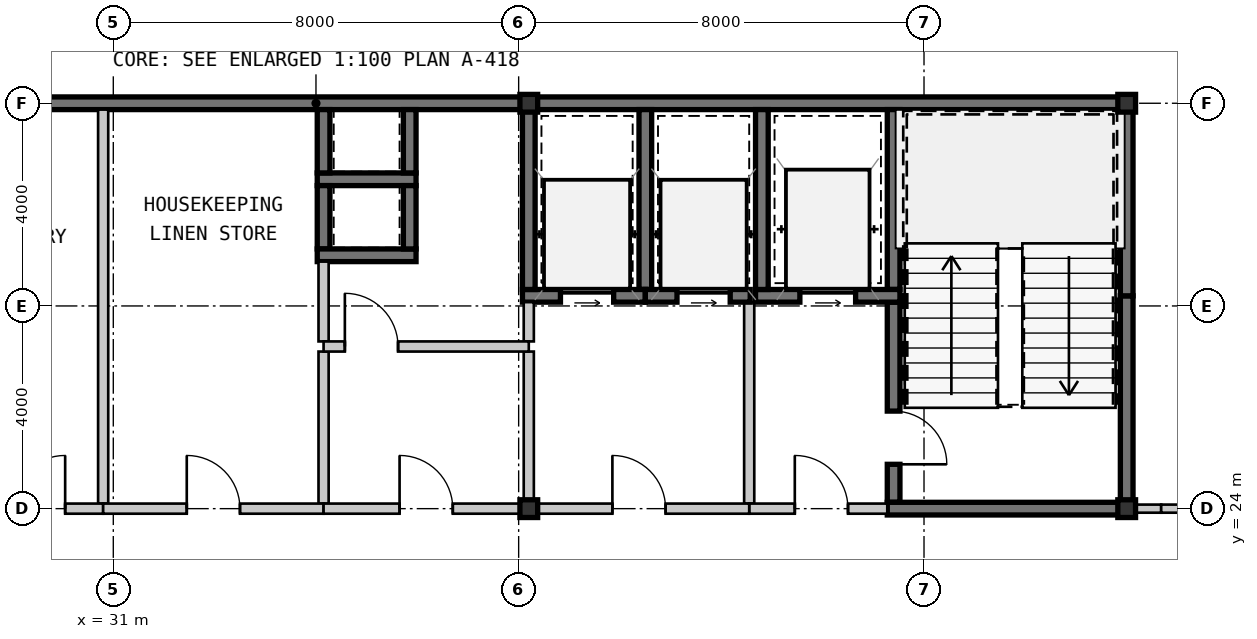
"""IFC4 building model, lengths in metres.
Left out: names, types, materials, properties, quantities, classifications, styles, units other than length and angle.
Written with IfcOpenShell. Run it as: python <this file> out.ifc"""

import sys

from ifc_helpers import new_model, si_unit, direction, frame, frame_2d, origin, origin_2d, place, context, subcontext, project, spatial, rectangle, hollow_rectangle, extrude, source, transform, mapped, element, fill, save


model = new_model("IFC4")
c1 = context("Model", 3, precision=1e-05, world=origin(), true_north=direction((0.0, 1.0)))
c2 = subcontext(c1, "Body", "Model", "MODEL_VIEW")
j1 = project(units=[si_unit("LENGTHUNIT", "METRE"), si_unit("PLANEANGLEUNIT", "RADIAN")], contexts=[c1])
p1 = place(None, origin())
s1 = spatial("IfcSite", under=j1, at=p1, CompositionType="ELEMENT")
p2 = place(p1, origin())
s2 = spatial("IfcBuilding", under=s1, at=p2, CompositionType="ELEMENT")
p3 = place(p2, frame((0.0, 0.0, 172.55)))
s3 = spatial("IfcBuildingStorey", under=s2, at=p3, CompositionType="ELEMENT", Elevation=172.55)
m1 = source(origin(), c2, "Body", "SweptSolid", [
    extrude(hollow_rectangle(XDim=0.35, YDim=0.35, WallThickness=0.016, at=origin_2d()), origin(), (0.0, 0.0, 1.0), 3.15),
])
for number, where, z_axis, x_axis in (
    (1, (39.2, 24.0, 0.0), (0.0, 0.0, 1.0), (1.0, 0.0, 0.0)),
    (2, (51.0, 24.0, 0.0), (0.0, 0.0, 1.0), (1.0, 0.0, 0.0)),
    (3, (39.2, 32.0, 0.0), (0.0, 0.0, 1.0), (1.0, 0.0, 0.0)),
    (4, (51.0, 32.0, 0.0), (0.0, 0.0, 1.0), (1.0, 0.0, 0.0)),
):
    element("IfcColumn", number, at=place(p3, frame(where, z_axis=z_axis, x_axis=x_axis)), inside=s3, PredefinedType="COLUMN", context=c2, shape_type="MappedRepresentation", body=[
        mapped(m1, transform((0.0, 0.0, 0.0), scale=1.0)),
    ])
m2 = source(origin(), c2, "Body", "SweptSolid", [
    extrude(rectangle(XDim=11.2, YDim=0.25, at=frame_2d((5.6, 0.0))), origin(), (0.0, 0.0, 1.0), 2.93),
])
p4 = place(p3, frame((28.0, 32.0, 0.0), z_axis=(0.0, 0.0, 1.0), x_axis=(1.0, 0.0, 0.0)))
e5 = element("IfcWall", 5, at=p4, inside=s3, PredefinedType="SHEAR", context=c2, shape_type="MappedRepresentation", body=[
    mapped(m2, transform((0.0, 0.0, 0.0), scale=1.0)),
])
m3 = source(origin(), c2, "Body", "SweptSolid", [
    extrude(rectangle(XDim=11.925, YDim=0.25, at=frame_2d((5.962, 0.0))), origin(), (0.0, 0.0, 1.0), 2.93),
])
p5 = place(p3, frame((39.2, 32.0, 0.0), z_axis=(0.0, 0.0, 1.0), x_axis=(1.0, 0.0, 0.0)))
e6 = element("IfcWall", 6, at=p5, inside=s3, PredefinedType="SHEAR", context=c2, shape_type="MappedRepresentation", body=[
    mapped(m3, transform((0.0, 0.0, 0.0), scale=1.0)),
])
m4 = source(origin(), c2, "Body", "SweptSolid", [
    extrude(rectangle(XDim=4.075, YDim=0.25, at=frame_2d((2.038, 0.0))), origin(), (0.0, 0.0, 1.0), 2.93),
])
p6 = place(p3, frame((51.0, 24.125, 0.0), z_axis=(0.0, 0.0, 1.0), x_axis=(0.0, 1.0, 0.0)))
e7 = element("IfcWall", 7, at=p6, inside=s3, PredefinedType="SHEAR", context=c2, shape_type="MappedRepresentation", body=[
    mapped(m4, transform((0.0, 0.0, 0.0), scale=1.0)),
])
m5 = source(origin(), c2, "Body", "SweptSolid", [
    extrude(rectangle(XDim=3.675, YDim=0.25, at=frame_2d((1.837, 0.0))), origin(), (0.0, 0.0, 1.0), 2.93),
])
p7 = place(p3, frame((51.0, 28.2, 0.0), z_axis=(0.0, 0.0, 1.0), x_axis=(0.0, 1.0, 0.0)))
e8 = element("IfcWall", 8, at=p7, inside=s3, PredefinedType="SHEAR", context=c2, shape_type="MappedRepresentation", body=[
    mapped(m5, transform((0.0, 0.0, 0.0), scale=1.0)),
])
m6 = source(origin(), c2, "Body", "SweptSolid", [
    extrude(rectangle(XDim=3.55, YDim=0.25, at=frame_2d((1.775, 0.0))), origin(), (0.0, 0.0, 1.0), 2.93),
])
p8 = place(p3, frame((46.4, 31.875, 0.0), z_axis=(0.0, 0.0, 1.0), x_axis=(0.0, -1.0, 0.0)))
e9 = element("IfcWall", 9, at=p8, inside=s3, PredefinedType="SHEAR", context=c2, shape_type="MappedRepresentation", body=[
    mapped(m6, transform((0.0, 0.0, 0.0), scale=1.0)),
])
m7 = source(origin(), c2, "Body", "SweptSolid", [
    extrude(rectangle(XDim=3.95, YDim=0.25, at=frame_2d((1.975, 0.0))), origin(), (0.0, 0.0, 1.0), 2.93),
])
p9 = place(p3, frame((46.4, 28.075, 0.0), z_axis=(0.0, 0.0, 1.0), x_axis=(0.0, -1.0, 0.0)))
e10 = element("IfcWall", 10, at=p9, inside=s3, PredefinedType="SHEAR", context=c2, shape_type="MappedRepresentation", body=[
    mapped(m7, transform((0.0, 0.0, 0.0), scale=1.0)),
])
m8 = source(origin(), c2, "Body", "SweptSolid", [
    extrude(rectangle(XDim=1.05, YDim=2.1, at=frame_2d((0.525, 1.05))), frame((0.0, 0.135, 0.0), z_axis=(0.0, -1.0, 0.0), x_axis=(1.0, 0.0, 0.0)), (0.0, 0.0, 1.0), 0.27),
])
p10 = place(p9, frame((2.15, 0.0, 0.0)))
e11 = element("IfcOpeningElement", 11, at=p10, cuts=e10, PredefinedType="OPENING", context=c2, shape_type="MappedRepresentation", body=[
    mapped(m8, transform((0.0, 0.0, 0.0), scale=1.0)),
])
m9 = source(origin(), c2, "Body", "SweptSolid", [
    extrude(rectangle(XDim=4.85, YDim=0.25, at=frame_2d((2.425, 0.0))), origin(), (0.0, 0.0, 1.0), 2.93),
])
p11 = place(p3, frame((46.275, 24.0, 0.0), z_axis=(0.0, 0.0, 1.0), x_axis=(1.0, 0.0, 0.0)))
e12 = element("IfcWall", 12, at=p11, inside=s3, PredefinedType="SHEAR", context=c2, shape_type="MappedRepresentation", body=[
    mapped(m9, transform((0.0, 0.0, 0.0), scale=1.0)),
])
m10 = source(origin(), c2, "Body", "SweptSolid", [
    extrude(rectangle(XDim=2.85, YDim=0.25, at=frame_2d((1.425, 0.0))), origin(), (0.0, 0.0, 1.0), 2.93),
])
p12 = place(p3, frame((43.675, 28.2, 0.0), z_axis=(0.0, 0.0, 1.0), x_axis=(1.0, 0.0, 0.0)))
e13 = element("IfcWall", 13, at=p12, inside=s3, PredefinedType="SHEAR", context=c2, shape_type="MappedRepresentation", body=[
    mapped(m10, transform((0.0, 0.0, 0.0), scale=1.0)),
])
m11 = source(origin(), c2, "Body", "SweptSolid", [
    extrude(rectangle(XDim=1.1, YDim=2.15, at=frame_2d((0.55, 1.075))), frame((0.0, 0.135, 0.0), z_axis=(0.0, -1.0, 0.0), x_axis=(1.0, 0.0, 0.0)), (0.0, 0.0, 1.0), 0.27),
])
p13 = place(p12, frame((0.875, 0.0, 0.0)))
e14 = element("IfcOpeningElement", 14, at=p13, cuts=e13, PredefinedType="OPENING", context=c2, shape_type="MappedRepresentation", body=[
    mapped(m11, transform((0.0, 0.0, 0.0), scale=1.0)),
])
p14 = place(p3, frame((43.8, 31.875, 0.0), z_axis=(0.0, 0.0, 1.0), x_axis=(0.0, -1.0, 0.0)))
e15 = element("IfcWall", 15, at=p14, inside=s3, PredefinedType="SHEAR", context=c2, shape_type="MappedRepresentation", body=[
    mapped(m6, transform((0.0, 0.0, 0.0), scale=1.0)),
])
m12 = source(origin(), c2, "Body", "SweptSolid", [
    extrude(rectangle(XDim=3.975, YDim=0.2, at=frame_2d((1.987, 0.0))), origin(), (0.0, 0.0, 1.0), 2.93),
])
p15 = place(p3, frame((43.55, 28.075, 0.0), z_axis=(0.0, 0.0, 1.0), x_axis=(0.0, -1.0, 0.0)))
e16 = element("IfcWall", 16, at=p15, inside=s3, PredefinedType="SOLIDWALL", context=c2, shape_type="MappedRepresentation", body=[
    mapped(m12, transform((0.0, 0.0, 0.0), scale=1.0)),
])
m13 = source(origin(), c2, "Body", "SweptSolid", [
    extrude(rectangle(XDim=2.725, YDim=0.2, at=frame_2d((1.362, 0.0))), origin(), (0.0, 0.0, 1.0), 2.397),
])
p16 = place(p3, frame((43.55, 24.0, 0.0), z_axis=(0.0, 0.0, 1.0), x_axis=(1.0, 0.0, 0.0)))
e17 = element("IfcWall", 17, at=p16, inside=s3, PredefinedType="SOLIDWALL", context=c2, shape_type="MappedRepresentation", body=[
    mapped(m13, transform((0.0, 0.0, 0.0), scale=1.0)),
])
m14 = source(origin(), c2, "Body", "SweptSolid", [
    extrude(rectangle(XDim=1.05, YDim=2.1, at=frame_2d((0.525, 1.05))), frame((0.0, 0.11, 0.0), z_axis=(0.0, -1.0, 0.0), x_axis=(1.0, 0.0, 0.0)), (0.0, 0.0, 1.0), 0.22),
])
p17 = place(p16, frame((0.9, 0.0, 0.0)))
e18 = element("IfcOpeningElement", 18, at=p17, cuts=e17, PredefinedType="OPENING", context=c2, shape_type="MappedRepresentation", body=[
    mapped(m14, transform((0.0, 0.0, 0.0), scale=1.0)),
])
m15 = source(origin(), c2, "Body", "SweptSolid", [
    extrude(rectangle(XDim=1.95, YDim=0.25, at=frame_2d((0.975, 0.0))), origin(), (0.0, 0.0, 1.0), 2.93),
])
p18 = place(p3, frame((35.025, 30.5, 0.0), z_axis=(0.0, 0.0, 1.0), x_axis=(1.0, 0.0, 0.0)))
e19 = element("IfcWall", 19, at=p18, inside=s3, PredefinedType="SHEAR", context=c2, shape_type="MappedRepresentation", body=[
    mapped(m15, transform((0.0, 0.0, 0.0), scale=1.0)),
])
m16 = source(origin(), c2, "Body", "SweptSolid", [
    extrude(rectangle(XDim=1.25, YDim=0.25, at=frame_2d((0.625, 0.0))), origin(), (0.0, 0.0, 1.0), 2.93),
])
for number, where, z_axis, x_axis in (
    (20, (35.15, 31.875, 0.0), (0.0, 0.0, 1.0), (0.0, -1.0, 0.0)),
    (21, (36.85, 30.625, 0.0), (0.0, 0.0, 1.0), (0.0, 1.0, 0.0)),
    (22, (35.15, 30.375, 0.0), (0.0, 0.0, 1.0), (0.0, -1.0, 0.0)),
):
    element("IfcWall", number, at=place(p3, frame(where, z_axis=z_axis, x_axis=x_axis)), inside=s3, PredefinedType="SHEAR", context=c2, shape_type="MappedRepresentation", body=[
        mapped(m16, transform((0.0, 0.0, 0.0), scale=1.0)),
    ])
p19 = place(p3, frame((35.025, 29.0, 0.0), z_axis=(0.0, 0.0, 1.0), x_axis=(1.0, 0.0, 0.0)))
e23 = element("IfcWall", 23, at=p19, inside=s3, PredefinedType="SHEAR", context=c2, shape_type="MappedRepresentation", body=[
    mapped(m15, transform((0.0, 0.0, 0.0), scale=1.0)),
])
p20 = place(p3, frame((36.85, 29.125, 0.0), z_axis=(0.0, 0.0, 1.0), x_axis=(0.0, 1.0, 0.0)))
e24 = element("IfcWall", 24, at=p20, inside=s3, PredefinedType="SHEAR", context=c2, shape_type="MappedRepresentation", body=[
    mapped(m16, transform((0.0, 0.0, 0.0), scale=1.0)),
])
p21 = place(p3, frame((41.5, 28.325, 0.0), z_axis=(0.0, 0.0, 1.0), x_axis=(0.0, 1.0, 0.0)))
e25 = element("IfcWall", 25, at=p21, inside=s3, PredefinedType="SHEAR", context=c2, shape_type="MappedRepresentation", body=[
    mapped(m6, transform((0.0, 0.0, 0.0), scale=1.0)),
])
m17 = source(origin(), c2, "Body", "SweptSolid", [
    extrude(rectangle(XDim=2.425, YDim=0.25, at=frame_2d((1.212, 0.0))), origin(), (0.0, 0.0, 1.0), 2.93),
])
p22 = place(p3, frame((39.075, 28.2, 0.0), z_axis=(0.0, 0.0, 1.0), x_axis=(1.0, 0.0, 0.0)))
e26 = element("IfcWall", 26, at=p22, inside=s3, PredefinedType="SHEAR", context=c2, shape_type="MappedRepresentation", body=[
    mapped(m17, transform((0.0, 0.0, 0.0), scale=1.0)),
])
m18 = source(origin(), c2, "Body", "SweptSolid", [
    extrude(rectangle(XDim=1.05, YDim=2.15, at=frame_2d((0.525, 1.075))), frame((0.0, 0.135, 0.0), z_axis=(0.0, -1.0, 0.0), x_axis=(1.0, 0.0, 0.0)), (0.0, 0.0, 1.0), 0.27),
])
p23 = place(p22, frame((0.75, 0.0, 0.0)))
e27 = element("IfcOpeningElement", 27, at=p23, cuts=e26, PredefinedType="OPENING", context=c2, shape_type="MappedRepresentation", body=[
    mapped(m18, transform((0.0, 0.0, 0.0), scale=1.0)),
])
p24 = place(p3, frame((39.2, 31.875, 0.0), z_axis=(0.0, 0.0, 1.0), x_axis=(0.0, -1.0, 0.0)))
e28 = element("IfcWall", 28, at=p24, inside=s3, PredefinedType="SHEAR", context=c2, shape_type="MappedRepresentation", body=[
    mapped(m6, transform((0.0, 0.0, 0.0), scale=1.0)),
])
m19 = source(origin(), c2, "Body", "SweptSolid", [
    extrude(rectangle(XDim=2.07, YDim=0.25, at=frame_2d((1.035, 0.0))), origin(), (0.0, 0.0, 1.0), 2.93),
])
p25 = place(p3, frame((41.5, 28.2, 0.0), z_axis=(0.0, 0.0, 1.0), x_axis=(1.0, 0.0, 0.0)))
e29 = element("IfcWall", 29, at=p25, inside=s3, PredefinedType="SHEAR", context=c2, shape_type="MappedRepresentation", body=[
    mapped(m19, transform((0.0, 0.0, 0.0), scale=1.0)),
])
p26 = place(p25, frame((0.625, 0.0, 0.0)))
e30 = element("IfcOpeningElement", 30, at=p26, cuts=e29, PredefinedType="OPENING", context=c2, shape_type="MappedRepresentation", body=[
    mapped(m18, transform((0.0, 0.0, 0.0), scale=1.0)),
])
m20 = source(origin(), c2, "Body", "SweptSolid", [
    extrude(rectangle(XDim=3.0, YDim=0.2, at=frame_2d((1.5, 0.0))), origin(), (0.0, 0.0, 1.0), 2.47),
])
p27 = place(p3, frame((39.2, 24.1, 0.0), z_axis=(0.0, 0.0, 1.0), x_axis=(0.0, 1.0, 0.0)))
e31 = element("IfcWall", 31, at=p27, inside=s3, PredefinedType="SOLIDWALL", context=c2, shape_type="MappedRepresentation", body=[
    mapped(m20, transform((0.0, 0.0, 0.0), scale=1.0)),
])
m21 = source(origin(), c2, "Body", "SweptSolid", [
    extrude(rectangle(XDim=0.775, YDim=0.2, at=frame_2d((0.387, 0.0))), origin(), (0.0, 0.0, 1.0), 2.47),
])
p28 = place(p3, frame((39.2, 27.3, 0.0), z_axis=(0.0, 0.0, 1.0), x_axis=(0.0, 1.0, 0.0)))
e32 = element("IfcWall", 32, at=p28, inside=s3, PredefinedType="SOLIDWALL", context=c2, shape_type="MappedRepresentation", body=[
    mapped(m21, transform((0.0, 0.0, 0.0), scale=1.0)),
])
m22 = source(origin(), c2, "Body", "SweptSolid", [
    extrude(rectangle(XDim=4.35, YDim=0.2, at=frame_2d((2.175, 0.0))), origin(), (0.0, 0.0, 1.0), 2.397),
])
p29 = place(p3, frame((43.55, 24.0, 0.0), z_axis=(0.0, 0.0, 1.0), x_axis=(-1.0, 0.0, 0.0)))
e33 = element("IfcWall", 33, at=p29, inside=s3, PredefinedType="SOLIDWALL", context=c2, shape_type="MappedRepresentation", body=[
    mapped(m22, transform((0.0, 0.0, 0.0), scale=1.0)),
])
p30 = place(p29, frame((1.65, 0.0, 0.0)))
e34 = element("IfcOpeningElement", 34, at=p30, cuts=e33, PredefinedType="OPENING", context=c2, shape_type="MappedRepresentation", body=[
    mapped(m14, transform((0.0, 0.0, 0.0), scale=1.0)),
])
m23 = source(origin(), c2, "Body", "SweptSolid", [
    extrude(rectangle(XDim=7.775, YDim=0.2, at=frame_2d((3.887, 0.0))), origin(), (0.0, 0.0, 1.0), 2.93),
])
p31 = place(p3, frame((30.8, 31.875, 0.0), z_axis=(0.0, 0.0, 1.0), x_axis=(0.0, -1.0, 0.0)))
e35 = element("IfcWall", 35, at=p31, inside=s3, PredefinedType="SOLIDWALL", context=c2, shape_type="MappedRepresentation", body=[
    mapped(m23, transform((0.0, 0.0, 0.0), scale=1.0)),
])
m24 = source(origin(), c2, "Body", "SweptSolid", [
    extrude(rectangle(XDim=4.35, YDim=0.2, at=frame_2d((2.175, 0.0))), origin(), (0.0, 0.0, 1.0), 2.47),
])
p32 = place(p3, frame((30.8, 24.0, 0.0), z_axis=(0.0, 0.0, 1.0), x_axis=(-1.0, 0.0, 0.0)))
e36 = element("IfcWall", 36, at=p32, inside=s3, PredefinedType="SOLIDWALL", context=c2, shape_type="MappedRepresentation", body=[
    mapped(m24, transform((0.0, 0.0, 0.0), scale=1.0)),
])
p33 = place(p32, frame((0.75, 0.0, 0.0)))
e37 = element("IfcOpeningElement", 37, at=p33, cuts=e36, PredefinedType="OPENING", context=c2, shape_type="MappedRepresentation", body=[
    mapped(m14, transform((0.0, 0.0, 0.0), scale=1.0)),
])
m25 = source(origin(), c2, "Body", "SweptSolid", [
    extrude(rectangle(XDim=3.0, YDim=0.2, at=frame_2d((1.5, 0.0))), origin(), (0.0, 0.0, 1.0), 2.93),
])
p34 = place(p3, frame((35.15, 27.1, 0.0), z_axis=(0.0, 0.0, 1.0), x_axis=(0.0, -1.0, 0.0)))
e38 = element("IfcWall", 38, at=p34, inside=s3, PredefinedType="SOLIDWALL", context=c2, shape_type="MappedRepresentation", body=[
    mapped(m25, transform((0.0, 0.0, 0.0), scale=1.0)),
])
m26 = source(origin(), c2, "Body", "SweptSolid", [
    extrude(rectangle(XDim=1.575, YDim=0.2, at=frame_2d((0.788, 0.0))), origin(), (0.0, 0.0, 1.0), 2.93),
])
p35 = place(p3, frame((35.15, 28.875, 0.0), z_axis=(0.0, 0.0, 1.0), x_axis=(0.0, -1.0, 0.0)))
e39 = element("IfcWall", 39, at=p35, inside=s3, PredefinedType="SOLIDWALL", context=c2, shape_type="MappedRepresentation", body=[
    mapped(m26, transform((0.0, 0.0, 0.0), scale=1.0)),
])
m27 = source(origin(), c2, "Body", "SweptSolid", [
    extrude(rectangle(XDim=4.35, YDim=0.2, at=frame_2d((2.175, 0.0))), origin(), (0.0, 0.0, 1.0), 2.47),
])
p36 = place(p3, frame((35.15, 24.0, 0.0), z_axis=(0.0, 0.0, 1.0), x_axis=(-1.0, 0.0, 0.0)))
e40 = element("IfcWall", 40, at=p36, inside=s3, PredefinedType="SOLIDWALL", context=c2, shape_type="MappedRepresentation", body=[
    mapped(m27, transform((0.0, 0.0, 0.0), scale=1.0)),
])
p37 = place(p36, frame((1.65, 0.0, 0.0)))
e41 = element("IfcOpeningElement", 41, at=p37, cuts=e40, PredefinedType="OPENING", context=c2, shape_type="MappedRepresentation", body=[
    mapped(m14, transform((0.0, 0.0, 0.0), scale=1.0)),
])
m28 = source(origin(), c2, "Body", "SweptSolid", [
    extrude(rectangle(XDim=4.05, YDim=0.2, at=frame_2d((2.025, 0.0))), origin(), (0.0, 0.0, 1.0), 2.93),
])
p38 = place(p3, frame((35.15, 27.2, 0.0), z_axis=(0.0, 0.0, 1.0), x_axis=(1.0, 0.0, 0.0)))
e42 = element("IfcWall", 42, at=p38, inside=s3, PredefinedType="SOLIDWALL", context=c2, shape_type="MappedRepresentation", body=[
    mapped(m28, transform((0.0, 0.0, 0.0), scale=1.0)),
])
p39 = place(p38, frame((0.42, 0.0, 0.0)))
e43 = element("IfcOpeningElement", 43, at=p39, cuts=e42, PredefinedType="OPENING", context=c2, shape_type="MappedRepresentation", body=[
    mapped(m14, transform((0.0, 0.0, 0.0), scale=1.0)),
])
m29 = source(origin(), c2, "Body", "SweptSolid", [
    extrude(rectangle(XDim=4.05, YDim=0.2, at=frame_2d((2.025, 0.0))), origin(), (0.0, 0.0, 1.0), 2.47),
])
p40 = place(p3, frame((39.2, 24.0, 0.0), z_axis=(0.0, 0.0, 1.0), x_axis=(-1.0, 0.0, 0.0)))
e44 = element("IfcWall", 44, at=p40, inside=s3, PredefinedType="SOLIDWALL", context=c2, shape_type="MappedRepresentation", body=[
    mapped(m29, transform((0.0, 0.0, 0.0), scale=1.0)),
])
p41 = place(p40, frame((1.5, 0.0, 0.0)))
e45 = element("IfcOpeningElement", 45, at=p41, cuts=e44, PredefinedType="OPENING", context=c2, shape_type="MappedRepresentation", body=[
    mapped(m14, transform((0.0, 0.0, 0.0), scale=1.0)),
])
m30 = source(origin(), c2, "Body", "SweptSolid", [
    extrude(rectangle(XDim=0.556, YDim=0.16, at=frame_2d((0.278, 0.0))), origin(), (0.0, 0.0, 1.0), 2.47),
])
p42 = place(p3, frame((51.125, 24.0, 0.0), z_axis=(0.0, 0.0, 1.0), x_axis=(1.0, 0.0, 0.0)))
e46 = element("IfcWall", 46, at=p42, inside=s3, PredefinedType="PARTITIONING", context=c2, shape_type="MappedRepresentation", body=[
    mapped(m30, transform((0.0, 0.0, 0.0), scale=1.0)),
])
m31 = source(origin(), c2, "Body", "SweptSolid", [
    extrude(rectangle(XDim=9.153, YDim=0.16, at=frame_2d((4.576, 0.0))), origin(), (0.0, 0.0, 1.0), 2.93),
])
p43 = place(p3, frame((51.681, 24.0, 0.0), z_axis=(0.0, 0.0, 1.0), x_axis=(1.0, 0.0, 0.0)))
e47 = element("IfcWall", 47, at=p43, inside=s3, PredefinedType="PARTITIONING", context=c2, shape_type="MappedRepresentation", body=[
    mapped(m31, transform((0.0, 0.0, 0.0), scale=1.0)),
])
m32 = source(origin(), c2, "Body", "SweptSolid", [
    extrude(rectangle(XDim=0.92, YDim=2.1, at=frame_2d((0.46, 1.05))), frame((0.0, 0.09, 0.0), z_axis=(0.0, -1.0, 0.0), x_axis=(1.0, 0.0, 0.0)), (0.0, 0.0, 1.0), 0.18),
])
p44 = place(p43, frame((3.786, 0.0, 0.0)))
e48 = element("IfcOpeningElement", 48, at=p44, cuts=e47, PredefinedType="OPENING", context=c2, shape_type="MappedRepresentation", body=[
    mapped(m32, transform((0.0, 0.0, 0.0), scale=1.0)),
])
m33 = source(origin(), c2, "Body", "SweptSolid", [
    extrude(rectangle(XDim=1.05, YDim=2.1, at=frame_2d((0.525, 1.05))), frame((0.0, 0.025, 0.0), z_axis=(0.0, -1.0, 0.0), x_axis=(1.0, 0.0, 0.0)), (0.0, 0.0, 1.0), 0.05),
])
p45 = place(p10, origin())
e49 = element("IfcDoor", 49, at=p45, inside=s3, OperationType="SINGLE_SWING_RIGHT", PredefinedType="DOOR", context=c2, shape_type="MappedRepresentation", body=[
    mapped(m33, transform((0.0, 0.0, 0.0), scale=1.0)),
])
fill(e11, e49)
m34 = source(origin(), c2, "Body", "SweptSolid", [
    extrude(rectangle(XDim=1.1, YDim=2.15, at=frame_2d((0.55, 1.075))), frame((0.0, 0.025, 0.0), z_axis=(0.0, -1.0, 0.0), x_axis=(1.0, 0.0, 0.0)), (0.0, 0.0, 1.0), 0.05),
])
p46 = place(p13, origin())
e50 = element("IfcDoor", 50, at=p46, inside=s3, OperationType="SLIDING_TO_LEFT", PredefinedType="DOOR", context=c2, shape_type="MappedRepresentation", body=[
    mapped(m34, transform((0.0, 0.0, 0.0), scale=1.0)),
])
fill(e14, e50)
p47 = place(p17, origin())
e51 = element("IfcDoor", 51, at=p47, inside=s3, OperationType="SINGLE_SWING_LEFT", PredefinedType="DOOR", context=c2, shape_type="MappedRepresentation", body=[
    mapped(m33, transform((0.0, 0.0, 0.0), scale=1.0)),
])
fill(e18, e51)
m35 = source(origin(), c2, "Body", "SweptSolid", [
    extrude(rectangle(XDim=1.05, YDim=2.15, at=frame_2d((0.525, 1.075))), frame((0.0, 0.025, 0.0), z_axis=(0.0, -1.0, 0.0), x_axis=(1.0, 0.0, 0.0)), (0.0, 0.0, 1.0), 0.05),
])
p48 = place(p23, origin())
e52 = element("IfcDoor", 52, at=p48, inside=s3, OperationType="SLIDING_TO_LEFT", PredefinedType="DOOR", context=c2, shape_type="MappedRepresentation", body=[
    mapped(m35, transform((0.0, 0.0, 0.0), scale=1.0)),
])
fill(e27, e52)
p49 = place(p26, origin())
e53 = element("IfcDoor", 53, at=p49, inside=s3, OperationType="SLIDING_TO_LEFT", PredefinedType="DOOR", context=c2, shape_type="MappedRepresentation", body=[
    mapped(m35, transform((0.0, 0.0, 0.0), scale=1.0)),
])
fill(e30, e53)
p50 = place(p30, frame((1.05, 0.0, 0.0), z_axis=(0.0, 0.0, 1.0), x_axis=(-1.0, 0.0, 0.0)))
e54 = element("IfcDoor", 54, at=p50, inside=s3, OperationType="SINGLE_SWING_LEFT", PredefinedType="DOOR", context=c2, shape_type="MappedRepresentation", body=[
    mapped(m33, transform((0.0, 0.0, 0.0), scale=1.0)),
])
fill(e34, e54)
p51 = place(p33, frame((1.05, 0.0, 0.0), z_axis=(0.0, 0.0, 1.0), x_axis=(-1.0, 0.0, 0.0)))
e55 = element("IfcDoor", 55, at=p51, inside=s3, OperationType="SINGLE_SWING_RIGHT", PredefinedType="DOOR", context=c2, shape_type="MappedRepresentation", body=[
    mapped(m33, transform((0.0, 0.0, 0.0), scale=1.0)),
])
fill(e37, e55)
p52 = place(p37, frame((1.05, 0.0, 0.0), z_axis=(0.0, 0.0, 1.0), x_axis=(-1.0, 0.0, 0.0)))
e56 = element("IfcDoor", 56, at=p52, inside=s3, OperationType="SINGLE_SWING_LEFT", PredefinedType="DOOR", context=c2, shape_type="MappedRepresentation", body=[
    mapped(m33, transform((0.0, 0.0, 0.0), scale=1.0)),
])
fill(e41, e56)
p53 = place(p39, origin())
e57 = element("IfcDoor", 57, at=p53, inside=s3, OperationType="SINGLE_SWING_LEFT", PredefinedType="DOOR", context=c2, shape_type="MappedRepresentation", body=[
    mapped(m33, transform((0.0, 0.0, 0.0), scale=1.0)),
])
fill(e43, e57)
p54 = place(p41, frame((1.05, 0.0, 0.0), z_axis=(0.0, 0.0, 1.0), x_axis=(-1.0, 0.0, 0.0)))
e58 = element("IfcDoor", 58, at=p54, inside=s3, OperationType="SINGLE_SWING_LEFT", PredefinedType="DOOR", context=c2, shape_type="MappedRepresentation", body=[
    mapped(m33, transform((0.0, 0.0, 0.0), scale=1.0)),
])
fill(e45, e58)
save(model, sys.argv[1])
